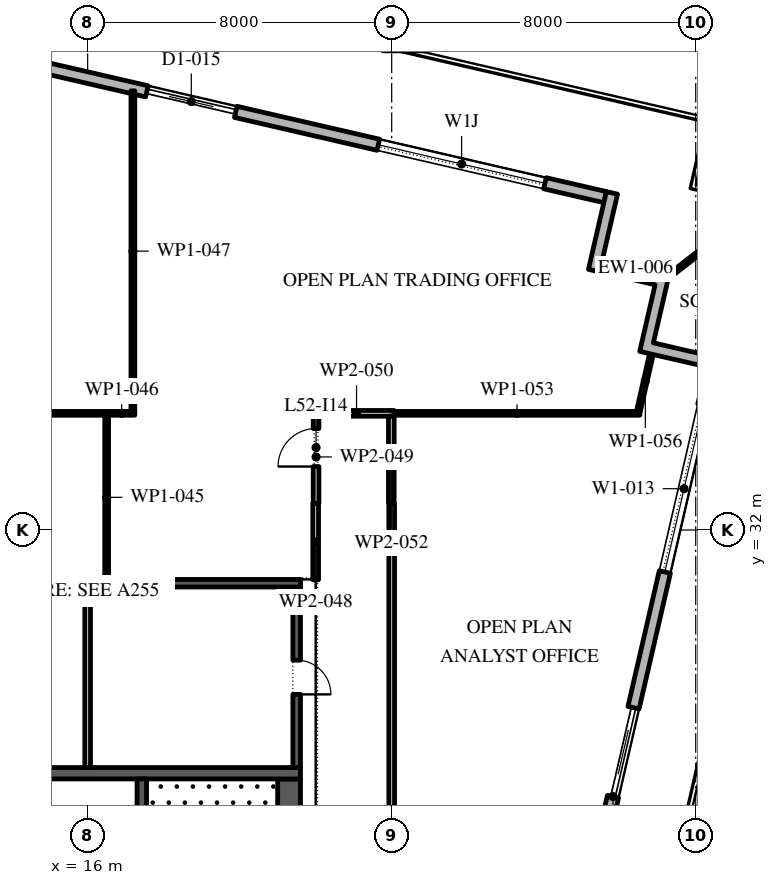
"""IFC4 building model, lengths in metres.
Left out: names, types, materials, properties, quantities, classifications, styles, units other than length and angle.
Written with IfcOpenShell. Run it as: python <this file> out.ifc"""

import sys

from ifc_helpers import new_model, si_unit, direction, frame, frame_2d, origin, origin_2d, place, context, subcontext, project, spatial, polyline, rectangle, outline, extrude, element, fill, save


model = new_model("IFC4")
c1 = context("Model", 3, precision=1e-05, world=origin(), true_north=direction((0.0, 1.0)))
c2 = subcontext(c1, "Body", "Model", "MODEL_VIEW")
j1 = project(units=[si_unit("LENGTHUNIT", "METRE"), si_unit("PLANEANGLEUNIT", "RADIAN")], contexts=[c1])
p1 = place(None, origin())
s1 = spatial("IfcSite", under=j1, at=p1, CompositionType="ELEMENT")
p2 = place(p1, origin())
s2 = spatial("IfcBuilding", under=s1, at=p2, CompositionType="ELEMENT")
p3 = place(p2, frame((0.0, 0.0, 243.0)))
s3 = spatial("IfcBuildingStorey", under=s2, at=p3, CompositionType="ELEMENT", Elevation=243.0)
p4 = place(p3, frame((24.32, 45.158, 0.0), z_axis=(0.020377597275, 0.088167842757, 0.995897175934), x_axis=(-0.97431566651, 0.225186549318, 0.0)))
e1 = element("IfcColumn", 1, at=p4, inside=s3, PredefinedType="COLUMN", context=c2, shape_type="SweptSolid", body=[
    extrude(rectangle(XDim=1.1, YDim=1.1, at=origin_2d()), origin(), (0.0, 0.0, 1.0), 4.217),
])
p5 = place(p3, frame((21.359, -11.678, 0.0), z_axis=(0.0, 0.0, 1.0), x_axis=(0.224949198343, 0.974370493275, 0.0)))
e2 = element("IfcWall", 2, at=p5, inside=s3, PredefinedType="STANDARD", context=c2, shape_type="SweptSolid", body=[
    extrude(rectangle(XDim=49.5, YDim=0.3, at=frame_2d((24.75, 0.0))), origin(), (0.0, 0.0, 1.0), 4.0),
])
p6 = place(p5, frame((1.157, 0.0, 0.45)))
e3 = element("IfcOpeningElement", 3, at=p6, cuts=e2, PredefinedType="OPENING", context=c2, shape_type="SweptSolid", body=[
    extrude(rectangle(XDim=4.5, YDim=3.05, at=frame_2d((2.25, 1.525))), frame((0.0, 0.16, 0.0), z_axis=(0.0, -1.0, 0.0), x_axis=(1.0, 0.0, 0.0)), (0.0, 0.0, 1.0), 0.32),
])
p7 = place(p5, frame((8.121, 0.0, 0.45)))
e4 = element("IfcOpeningElement", 4, at=p7, cuts=e2, PredefinedType="OPENING", context=c2, shape_type="SweptSolid", body=[
    extrude(rectangle(XDim=4.5, YDim=3.05, at=frame_2d((2.25, 1.525))), frame((0.0, 0.16, 0.0), z_axis=(0.0, -1.0, 0.0), x_axis=(1.0, 0.0, 0.0)), (0.0, 0.0, 1.0), 0.32),
])
p8 = place(p5, frame((15.236, 0.0, 0.45)))
e5 = element("IfcOpeningElement", 5, at=p8, cuts=e2, PredefinedType="OPENING", context=c2, shape_type="SweptSolid", body=[
    extrude(rectangle(XDim=4.5, YDim=3.05, at=frame_2d((2.25, 1.525))), frame((0.0, 0.16, 0.0), z_axis=(0.0, -1.0, 0.0), x_axis=(1.0, 0.0, 0.0)), (0.0, 0.0, 1.0), 0.32),
])
p9 = place(p5, frame((22.35, 0.0, 0.45)))
e6 = element("IfcOpeningElement", 6, at=p9, cuts=e2, PredefinedType="OPENING", context=c2, shape_type="SweptSolid", body=[
    extrude(rectangle(XDim=4.5, YDim=3.05, at=frame_2d((2.25, 1.525))), frame((0.0, 0.16, 0.0), z_axis=(0.0, -1.0, 0.0), x_axis=(1.0, 0.0, 0.0)), (0.0, 0.0, 1.0), 0.32),
])
p10 = place(p5, frame((29.464, 0.0, 0.45)))
e7 = element("IfcOpeningElement", 7, at=p10, cuts=e2, PredefinedType="OPENING", context=c2, shape_type="SweptSolid", body=[
    extrude(rectangle(XDim=4.5, YDim=2.95, at=frame_2d((2.25, 1.475))), frame((0.0, 0.16, 0.0), z_axis=(0.0, -1.0, 0.0), x_axis=(1.0, 0.0, 0.0)), (0.0, 0.0, 1.0), 0.32),
])
p11 = place(p5, frame((37.628, 0.0, 0.0)))
e8 = element("IfcOpeningElement", 8, at=p11, cuts=e2, PredefinedType="OPENING", context=c2, shape_type="SweptSolid", body=[
    extrude(rectangle(XDim=2.4, YDim=3.325, at=frame_2d((1.2, 1.663))), frame((0.0, 0.16, 0.0), z_axis=(0.0, -1.0, 0.0), x_axis=(1.0, 0.0, 0.0)), (0.0, 0.0, 1.0), 0.32),
])
p12 = place(p5, frame((43.693, 0.0, 0.45)))
e9 = element("IfcOpeningElement", 9, at=p12, cuts=e2, PredefinedType="OPENING", context=c2, shape_type="SweptSolid", body=[
    extrude(rectangle(XDim=4.5, YDim=3.05, at=frame_2d((2.25, 1.525))), frame((0.0, 0.16, 0.0), z_axis=(0.0, -1.0, 0.0), x_axis=(1.0, 0.0, 0.0)), (0.0, 0.0, 1.0), 0.32),
])
p13 = place(p3, frame((29.616, 40.758, 0.0), z_axis=(0.0, 0.0, 1.0), x_axis=(-0.974370532314, 0.224949029246, 0.0)))
e10 = element("IfcWall", 10, at=p13, inside=s3, PredefinedType="STANDARD", context=c2, shape_type="SweptSolid", body=[
    extrude(rectangle(XDim=48.0, YDim=0.3, at=frame_2d((24.0, 0.0))), origin(), (0.0, 0.0, 1.0), 4.0),
])
p14 = place(p13, frame((1.625, 0.0, 0.45)))
e11 = element("IfcOpeningElement", 11, at=p14, cuts=e10, PredefinedType="OPENING", context=c2, shape_type="SweptSolid", body=[
    extrude(rectangle(XDim=4.5, YDim=2.675, at=frame_2d((2.25, 1.337))), frame((0.0, 0.16, 0.0), z_axis=(0.0, -1.0, 0.0), x_axis=(1.0, 0.0, 0.0)), (0.0, 0.0, 1.0), 0.32),
])
p15 = place(p13, frame((9.975, 0.0, 0.0)))
e12 = element("IfcOpeningElement", 12, at=p15, cuts=e10, PredefinedType="OPENING", context=c2, shape_type="SweptSolid", body=[
    extrude(rectangle(XDim=2.4, YDim=3.5, at=frame_2d((1.2, 1.75))), frame((0.0, 0.16, 0.0), z_axis=(0.0, -1.0, 0.0), x_axis=(1.0, 0.0, 0.0)), (0.0, 0.0, 1.0), 0.32),
])
p16 = place(p13, frame((17.575, 0.0, 0.45)))
e13 = element("IfcOpeningElement", 13, at=p16, cuts=e10, PredefinedType="OPENING", context=c2, shape_type="SweptSolid", body=[
    extrude(rectangle(XDim=4.5, YDim=2.575, at=frame_2d((2.25, 1.288))), frame((0.0, 0.16, 0.0), z_axis=(0.0, -1.0, 0.0), x_axis=(1.0, 0.0, 0.0)), (0.0, 0.0, 1.0), 0.32),
])
p17 = place(p13, frame((25.625, 0.0, 0.45)))
e14 = element("IfcOpeningElement", 14, at=p17, cuts=e10, PredefinedType="OPENING", context=c2, shape_type="SweptSolid", body=[
    extrude(rectangle(XDim=4.5, YDim=2.45, at=frame_2d((2.25, 1.225))), frame((0.0, 0.16, 0.0), z_axis=(0.0, -1.0, 0.0), x_axis=(1.0, 0.0, 0.0)), (0.0, 0.0, 1.0), 0.32),
])
p18 = place(p13, frame((33.675, 0.0, 0.45)))
e15 = element("IfcOpeningElement", 15, at=p18, cuts=e10, PredefinedType="OPENING", context=c2, shape_type="SweptSolid", body=[
    extrude(rectangle(XDim=4.5, YDim=2.45, at=frame_2d((2.25, 1.225))), frame((0.0, 0.16, 0.0), z_axis=(0.0, -1.0, 0.0), x_axis=(1.0, 0.0, 0.0)), (0.0, 0.0, 1.0), 0.32),
])
p19 = place(p13, frame((42.775, 0.0, 0.0)))
e16 = element("IfcOpeningElement", 16, at=p19, cuts=e10, PredefinedType="OPENING", context=c2, shape_type="SweptSolid", body=[
    extrude(rectangle(XDim=2.4, YDim=3.5, at=frame_2d((1.2, 1.75))), frame((0.0, 0.16, 0.0), z_axis=(0.0, -1.0, 0.0), x_axis=(1.0, 0.0, 0.0)), (0.0, 0.0, 1.0), 0.32),
])
p20 = place(p3, origin())
e17 = element("IfcWall", 17, at=p20, inside=s3, PredefinedType="STANDARD", context=c2, shape_type="SweptSolid", body=[
    extrude(outline(polyline([(30.931, 38.453), (29.177, 38.858), (29.65, 40.905), (29.942, 40.837), (29.537, 39.083), (31.291, 38.678), (30.886, 36.924), (32.348, 36.587), (32.28, 36.295), (30.526, 36.699), (30.931, 38.453)])), origin(), (0.0, 0.0, 1.0), 4.0),
])
p21 = place(p3, frame((31.291, 38.678, -0.05), z_axis=(0.0, 0.0, 1.0), x_axis=(0.789894955112, 0.61324217067, 0.0)))
e18 = element("IfcWall", 18, at=p21, inside=s3, PredefinedType="STANDARD", context=c2, shape_type="SweptSolid", body=[
    extrude(rectangle(XDim=3.002, YDim=0.1, at=frame_2d((1.501, 0.0))), origin(), (0.0, 0.0, 1.0), 4.05),
])
p22 = place(p3, frame((21.3, -2.45, 0.0), z_axis=(0.0, 0.0, 1.0), x_axis=(0.0, 1.0, 0.0)))
e19 = element("IfcWall", 19, at=p22, inside=s3, PredefinedType="SHEAR", context=c2, shape_type="SweptSolid", body=[
    extrude(rectangle(XDim=27.9, YDim=0.6, at=frame_2d((13.95, 0.0))), origin(), (0.0, 0.0, 1.0), 4.0),
])
p23 = place(p22, frame((5.05, 0.0, 0.0)))
e20 = element("IfcOpeningElement", 20, at=p23, cuts=e19, PredefinedType="OPENING", context=c2, shape_type="SweptSolid", body=[
    extrude(rectangle(XDim=1.2, YDim=2.1, at=frame_2d((0.6, 1.05))), frame((0.0, 0.31, 0.0), z_axis=(0.0, -1.0, 0.0), x_axis=(1.0, 0.0, 0.0)), (0.0, 0.0, 1.0), 0.62),
])
p24 = place(p22, frame((21.65, 0.0, 0.0)))
e21 = element("IfcOpeningElement", 21, at=p24, cuts=e19, PredefinedType="OPENING", context=c2, shape_type="SweptSolid", body=[
    extrude(rectangle(XDim=1.2, YDim=2.1, at=frame_2d((0.6, 1.05))), frame((0.0, 0.31, 0.0), z_axis=(0.0, -1.0, 0.0), x_axis=(1.0, 0.0, 0.0)), (0.0, 0.0, 1.0), 0.62),
])
p25 = place(p3, frame((10.4, 25.6, 0.0), z_axis=(0.0, 0.0, 1.0), x_axis=(1.0, 0.0, 0.0)))
e22 = element("IfcWall", 22, at=p25, inside=s3, PredefinedType="SHEAR", context=c2, shape_type="SweptSolid", body=[
    extrude(rectangle(XDim=11.2, YDim=0.3, at=frame_2d((5.6, 0.0))), origin(), (0.0, 0.0, 1.0), 4.0),
])
p26 = place(p3, frame((17.425, 19.15, 0.0), z_axis=(0.0, 0.0, 1.0), x_axis=(0.0, 1.0, 0.0)))
e23 = element("IfcWall", 23, at=p26, inside=s3, PredefinedType="SHEAR", context=c2, shape_type="SweptSolid", body=[
    extrude(rectangle(XDim=6.3, YDim=0.25, at=frame_2d((3.15, 0.0))), origin(), (0.0, 0.0, 1.0), 4.0),
])
p27 = place(p26, frame((0.05, 0.0, 0.0)))
e24 = element("IfcOpeningElement", 24, at=p27, cuts=e23, PredefinedType="OPENING", context=c2, shape_type="SweptSolid", body=[
    extrude(rectangle(XDim=1.2, YDim=2.1, at=frame_2d((0.6, 1.05))), frame((0.0, 0.135, 0.0), z_axis=(0.0, -1.0, 0.0), x_axis=(1.0, 0.0, 0.0)), (0.0, 0.0, 1.0), 0.27),
])
p28 = place(p3, frame((21.5, 25.75, 0.0), z_axis=(0.0, 0.0, 1.0), x_axis=(0.0, 1.0, 0.0)))
e25 = element("IfcWall", 25, at=p28, inside=s3, PredefinedType="SHEAR", context=c2, shape_type="SweptSolid", body=[
    extrude(rectangle(XDim=4.75, YDim=0.2, at=frame_2d((2.375, 0.0))), origin(), (0.0, 0.0, 1.0), 4.0),
])
p29 = place(p28, frame((1.925, 0.0, 0.0)))
e26 = element("IfcOpeningElement", 26, at=p29, cuts=e25, PredefinedType="OPENING", context=c2, shape_type="SweptSolid", body=[
    extrude(rectangle(XDim=0.9, YDim=2.1, at=frame_2d((0.45, 1.05))), frame((0.0, 0.11, 0.0), z_axis=(0.0, -1.0, 0.0), x_axis=(1.0, 0.0, 0.0)), (0.0, 0.0, 1.0), 0.22),
])
p30 = place(p3, frame((10.4, 30.6, 0.0), z_axis=(0.0, 0.0, 1.0), x_axis=(1.0, 0.0, 0.0)))
e27 = element("IfcWall", 27, at=p30, inside=s3, PredefinedType="SHEAR", context=c2, shape_type="SweptSolid", body=[
    extrude(rectangle(XDim=11.2, YDim=0.2, at=frame_2d((5.6, 0.0))), origin(), (0.0, 0.0, 1.0), 4.0),
])
p31 = place(p3, frame((16.0, 25.75, 0.0), z_axis=(0.0, 0.0, 1.0), x_axis=(0.0, 1.0, 0.0)))
e28 = element("IfcWall", 28, at=p31, inside=s3, PredefinedType="PARTITIONING", context=c2, shape_type="SweptSolid", body=[
    extrude(rectangle(XDim=4.75, YDim=0.15, at=frame_2d((2.375, 0.0))), origin(), (0.0, 0.0, 1.0), 4.0),
])
p32 = place(p3, frame((10.065, 35.07, 0.0), z_axis=(0.0, 0.0, 1.0), x_axis=(1.0, 0.0, 0.0)))
e29 = element("IfcWall", 29, at=p32, inside=s3, PredefinedType="PARTITIONING", context=c2, shape_type="SweptSolid", body=[
    extrude(rectangle(XDim=6.485, YDim=0.1, at=frame_2d((3.243, 0.0))), origin(), (0.0, 0.0, 1.0), 4.0),
])
p33 = place(p3, frame((16.5, 35.02, 0.0), z_axis=(0.0, 0.0, 1.0), x_axis=(0.0, -1.0, 0.0)))
e30 = element("IfcWall", 30, at=p33, inside=s3, PredefinedType="PARTITIONING", context=c2, shape_type="SweptSolid", body=[
    extrude(rectangle(XDim=4.32, YDim=0.1, at=frame_2d((2.16, 0.0))), origin(), (0.0, 0.0, 1.0), 4.0),
])
p34 = place(p3, frame((17.24, 35.07, 0.0), z_axis=(0.0, 0.0, 1.0), x_axis=(-1.0, 0.0, 0.0)))
e31 = element("IfcWall", 31, at=p34, inside=s3, PredefinedType="PARTITIONING", context=c2, shape_type="SweptSolid", body=[
    extrude(rectangle(XDim=0.69, YDim=0.1, at=frame_2d((0.345, 0.0))), origin(), (0.0, 0.0, 1.0), 4.0),
])
p35 = place(p3, frame((17.19, 43.556, 0.0), z_axis=(0.0, 0.0, 1.0), x_axis=(0.0, -1.0, 0.0)))
e32 = element("IfcWall", 32, at=p35, inside=s3, PredefinedType="PARTITIONING", context=c2, shape_type="SweptSolid", body=[
    extrude(rectangle(XDim=8.436, YDim=0.1, at=frame_2d((4.218, 0.0))), origin(), (0.0, 0.0, 1.0), 4.0),
])
p36 = place(p3, frame((22.0, 30.69, 0.0), z_axis=(0.0, 0.0, 1.0), x_axis=(0.0, 1.0, 0.0)))
e33 = element("IfcWall", 33, at=p36, inside=s3, PredefinedType="PARTITIONING", context=c2, shape_type="SweptSolid", body=[
    extrude(rectangle(XDim=2.01, YDim=0.15, at=frame_2d((1.005, 0.0))), origin(), (0.0, 0.0, 1.0), 4.0),
])
p37 = place(p3, frame((22.01, 32.7, 0.0), z_axis=(0.0, 0.0, 1.0), x_axis=(0.0, 1.0, 0.0)))
e34 = element("IfcWall", 34, at=p37, inside=s3, PredefinedType="PARTITIONING", context=c2, shape_type="SweptSolid", body=[
    extrude(rectangle(XDim=2.445, YDim=0.15, at=frame_2d((1.223, 0.0))), origin(), (0.0, 0.0, 1.0), 4.0),
])
p38 = place(p37, frame((0.97, 0.0, 0.0)))
e35 = element("IfcOpeningElement", 35, at=p38, cuts=e34, PredefinedType="OPENING", context=c2, shape_type="SweptSolid", body=[
    extrude(rectangle(XDim=1.0, YDim=2.1, at=frame_2d((0.5, 1.05))), frame((0.0, 0.085, 0.0), z_axis=(0.0, -1.0, 0.0), x_axis=(1.0, 0.0, 0.0)), (0.0, 0.0, 1.0), 0.17),
])
p39 = place(p3, frame((22.085, 35.07, 0.0), z_axis=(0.0, 0.0, 1.0), x_axis=(1.0, 0.0, 0.0)))
e36 = element("IfcWall", 36, at=p39, inside=s3, PredefinedType="PARTITIONING", context=c2, shape_type="SweptSolid", body=[
    extrude(rectangle(XDim=1.98, YDim=0.15, at=frame_2d((0.99, 0.0))), origin(), (0.0, 0.0, 1.0), 4.0),
])
p40 = place(p3, frame((23.99, 34.995, 0.0), z_axis=(0.0, 0.0, 1.0), x_axis=(0.0, -1.0, 0.0)))
e37 = element("IfcWall", 37, at=p40, inside=s3, PredefinedType="PARTITIONING", context=c2, shape_type="SweptSolid", body=[
    extrude(rectangle(XDim=2.295, YDim=0.15, at=frame_2d((1.147, 0.0))), origin(), (0.0, 0.0, 1.0), 4.0),
])
p41 = place(p3, frame((24.065, 35.07, 0.0), z_axis=(0.0, 0.0, 1.0), x_axis=(1.0, 0.0, 0.0)))
e38 = element("IfcWall", 38, at=p41, inside=s3, PredefinedType="PARTITIONING", context=c2, shape_type="SweptSolid", body=[
    extrude(rectangle(XDim=6.465, YDim=0.1, at=frame_2d((3.232, 0.0))), origin(), (0.0, 0.0, 1.0), 4.0),
])
p42 = place(p3, frame((24.0, 32.7, 0.0), z_axis=(0.0, 0.0, 1.0), x_axis=(0.0, -1.0, 0.0)))
e39 = element("IfcWall", 39, at=p42, inside=s3, PredefinedType="PARTITIONING", context=c2, shape_type="SweptSolid", body=[
    extrude(rectangle(XDim=28.905, YDim=0.15, at=frame_2d((14.453, 0.0))), origin(), (0.0, 0.0, 1.0), 4.0),
])
p43 = place(p42, frame((19.83, 0.0, 0.0)))
e40 = element("IfcOpeningElement", 40, at=p43, cuts=e39, PredefinedType="OPENING", context=c2, shape_type="SweptSolid", body=[
    extrude(rectangle(XDim=1.0, YDim=2.1, at=frame_2d((0.5, 1.05))), frame((0.0, 0.085, 0.0), z_axis=(0.0, -1.0, 0.0), x_axis=(1.0, 0.0, 0.0)), (0.0, 0.0, 1.0), 0.17),
])
p44 = place(p3, frame((30.491, 35.119, 0.0), z_axis=(0.0, 0.0, 1.0), x_axis=(0.221461033886, 0.975169221453, 0.0)))
e41 = element("IfcWall", 41, at=p44, inside=s3, PredefinedType="PARTITIONING", context=c2, shape_type="SweptSolid", body=[
    extrude(rectangle(XDim=1.648, YDim=0.1, at=frame_2d((0.824, 0.0))), origin(), (0.0, 0.0, 1.0), 4.0),
])
p45 = place(p11, origin())
e42 = element("IfcDoor", 42, at=p45, inside=s3, OperationType="DOUBLE_DOOR_SLIDING", PredefinedType="DOOR", context=c2, shape_type="SweptSolid", body=[
    extrude(rectangle(XDim=2.4, YDim=3.325, at=frame_2d((1.2, 1.663))), frame((0.0, 0.025, 0.0), z_axis=(0.0, -1.0, 0.0), x_axis=(1.0, 0.0, 0.0)), (0.0, 0.0, 1.0), 0.05),
])
fill(e8, e42)
p46 = place(p12, origin())
e43 = element("IfcWindow", 43, at=p46, inside=s3, PartitioningType="DOUBLE_PANEL_VERTICAL", PredefinedType="WINDOW", context=c2, shape_type="SweptSolid", body=[
    extrude(rectangle(XDim=4.5, YDim=3.05, at=frame_2d((2.25, 1.525))), frame((0.0, 0.03, 0.0), z_axis=(0.0, -1.0, 0.0), x_axis=(1.0, 0.0, 0.0)), (0.0, 0.0, 1.0), 0.06),
])
fill(e9, e43)
p47 = place(p14, origin())
e44 = element("IfcWindow", 44, at=p47, inside=s3, PartitioningType="DOUBLE_PANEL_VERTICAL", PredefinedType="WINDOW", context=c2, shape_type="SweptSolid", body=[
    extrude(rectangle(XDim=4.5, YDim=2.675, at=frame_2d((2.25, 1.337))), frame((0.0, 0.03, 0.0), z_axis=(0.0, -1.0, 0.0), x_axis=(1.0, 0.0, 0.0)), (0.0, 0.0, 1.0), 0.06),
])
fill(e11, e44)
p48 = place(p15, origin())
e45 = element("IfcDoor", 45, at=p48, inside=s3, OperationType="DOUBLE_DOOR_SLIDING", PredefinedType="DOOR", context=c2, shape_type="SweptSolid", body=[
    extrude(rectangle(XDim=2.4, YDim=3.5, at=frame_2d((1.2, 1.75))), frame((0.0, 0.025, 0.0), z_axis=(0.0, -1.0, 0.0), x_axis=(1.0, 0.0, 0.0)), (0.0, 0.0, 1.0), 0.05),
])
fill(e12, e45)
p49 = place(p29, frame((0.9, 0.15, 0.0), z_axis=(0.0, 0.0, 1.0), x_axis=(-1.0, 0.0, 0.0)))
e46 = element("IfcDoor", 46, at=p49, inside=s3, OperationType="SINGLE_SWING_LEFT", PredefinedType="DOOR", context=c2, shape_type="SweptSolid", body=[
    extrude(rectangle(XDim=0.9, YDim=2.1, at=frame_2d((0.45, 1.05))), frame((0.0, 0.1, 0.0), z_axis=(0.0, -1.0, 0.0), x_axis=(1.0, 0.0, 0.0)), (0.0, 0.0, 1.0), 0.05),
])
fill(e26, e46)
p50 = place(p38, origin())
e47 = element("IfcDoor", 47, at=p50, inside=s3, OperationType="SINGLE_SWING_RIGHT", PredefinedType="DOOR", context=c2, shape_type="SweptSolid", body=[
    extrude(rectangle(XDim=1.0, YDim=2.1, at=frame_2d((0.5, 1.05))), frame((0.0, 0.025, 0.0), z_axis=(0.0, -1.0, 0.0), x_axis=(1.0, 0.0, 0.0)), (0.0, 0.0, 1.0), 0.05),
])
fill(e35, e47)
save(model, sys.argv[1])
